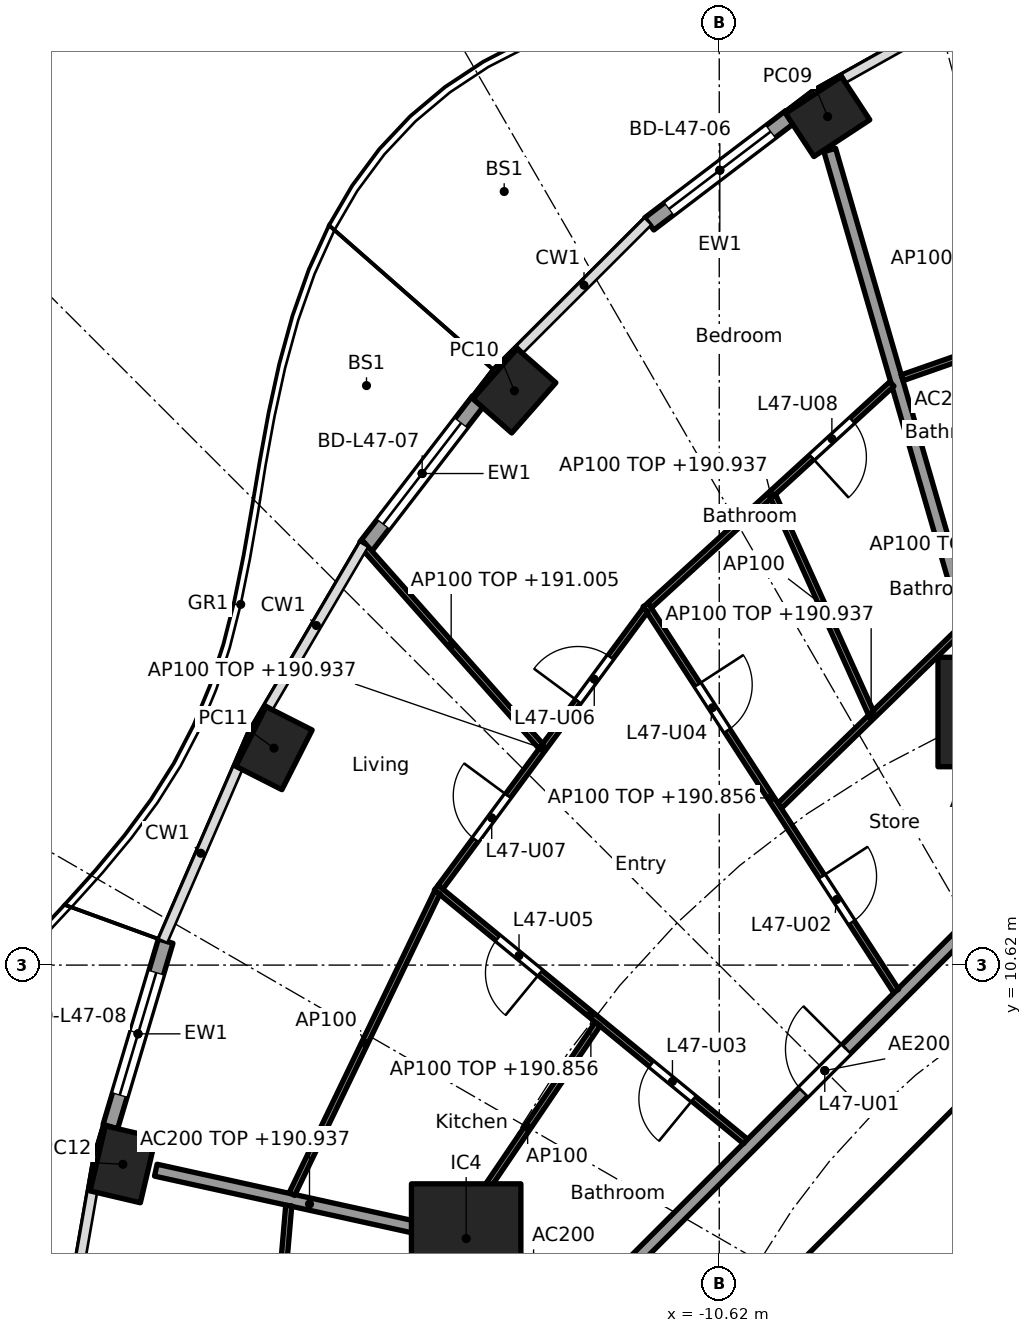
"""IFC4 building model, lengths in metres.
Left out: names, types, materials, properties, quantities, classifications, styles, units other than length and angle.
Written with IfcOpenShell. Run it as: python <this file> out.ifc"""

import sys

from ifc_helpers import new_model, si_unit, direction, frame, frame_2d, origin, origin_2d, place, context, subcontext, project, spatial, rectangle, hollow_rectangle, extrude, element, fill, save


model = new_model("IFC4")
c1 = context("Model", 3, precision=1e-05, world=origin(), true_north=direction((0.0, 1.0)))
c2 = subcontext(c1, "Body", "Model", "MODEL_VIEW")
j1 = project(units=[si_unit("LENGTHUNIT", "METRE"), si_unit("PLANEANGLEUNIT", "RADIAN")], contexts=[c1])
p1 = place(None, origin())
s1 = spatial("IfcSite", under=j1, at=p1, CompositionType="ELEMENT")
p2 = place(p1, origin())
s2 = spatial("IfcBuilding", under=s1, at=p2, CompositionType="ELEMENT")
p3 = place(p2, frame((0.0, 0.0, 188.1)))
s3 = spatial("IfcBuildingStorey", under=s2, at=p3, CompositionType="ELEMENT", Elevation=188.1)
for number, where, z_axis, x_axis in (
    (1, (-8.837, 24.573, 0.0), (0.0, 0.0, 1.0), (-0.836, -0.549, 0.0)),
    (2, (-13.989, 20.064, 0.0), (0.0, 0.0, 1.0), (-0.66, -0.751, 0.0)),
    (3, (-17.942, 14.188, 0.0), (0.0, 0.0, 1.0), (-0.452, -0.892, 0.0)),
    (4, (-20.427, 7.344, 0.0), (0.0, 0.0, 1.0), (-0.229, -0.973, 0.0)),
):
    element("IfcColumn", number, at=place(p3, frame(where, z_axis=z_axis, x_axis=x_axis)), inside=s3, PredefinedType="COLUMN", context=c2, shape_type="SweptSolid", body=[
        extrude(hollow_rectangle(XDim=1.1, YDim=0.85, WallThickness=0.036, at=origin_2d()), origin(), (0.0, 0.0, 1.0), 3.7),
    ])
for number, where, z_axis, x_axis in (
    (5, (-6.123, 14.782, 0.0), (0.0, 0.0, 1.0), (1.0, 0.0, 0.0)),
    (6, (-14.782, 6.123, 0.0), (0.0, 0.0, 1.0), (1.0, 0.0, 0.0)),
):
    element("IfcColumn", number, at=place(p3, frame(where, z_axis=z_axis, x_axis=x_axis)), inside=s3, PredefinedType="COLUMN", context=c2, shape_type="SweptSolid", body=[
        extrude(rectangle(XDim=1.8, YDim=1.8, at=origin_2d()), origin(), (0.0, 0.0, 1.0), 3.7),
    ])
p4 = place(p3, frame((-11.772, 22.809, 0.0), z_axis=(0.0, 0.0, 1.0), x_axis=(0.796055733703, 0.60522332146, 0.0)))
e7 = element("IfcWall", 7, at=p4, inside=s3, PredefinedType="SOLIDWALL", context=c2, shape_type="SweptSolid", body=[
    extrude(rectangle(XDim=2.917, YDim=0.25, at=frame_2d((1.458, 0.0))), origin(), (0.0, 0.0, 1.0), 3.44),
])
p5 = place(p4, frame((0.408, 0.0, 0.0)))
e8 = element("IfcOpeningElement", 8, at=p5, cuts=e7, PredefinedType="OPENING", context=c2, shape_type="SweptSolid", body=[
    extrude(rectangle(XDim=2.1, YDim=2.4, at=frame_2d((1.05, 1.2))), frame((0.0, 0.135, 0.0), z_axis=(0.0, -1.0, 0.0), x_axis=(1.0, 0.0, 0.0)), (0.0, 0.0, 1.0), 0.27),
])
p6 = place(p3, frame((-16.432, 17.502, 0.0), z_axis=(0.0, 0.0, 1.0), x_axis=(0.610437428894, 0.79206448311, 0.0)))
e9 = element("IfcWall", 9, at=p6, inside=s3, PredefinedType="SOLIDWALL", context=c2, shape_type="SweptSolid", body=[
    extrude(rectangle(XDim=3.035, YDim=0.25, at=frame_2d((1.518, 0.0))), origin(), (0.0, 0.0, 1.0), 3.44),
])
p7 = place(p6, frame((0.468, 0.0, 0.0)))
e10 = element("IfcOpeningElement", 10, at=p7, cuts=e9, PredefinedType="OPENING", context=c2, shape_type="SweptSolid", body=[
    extrude(rectangle(XDim=2.1, YDim=2.4, at=frame_2d((1.05, 1.2))), frame((0.0, 0.135, 0.0), z_axis=(0.0, -1.0, 0.0), x_axis=(1.0, 0.0, 0.0)), (0.0, 0.0, 1.0), 0.27),
])
p8 = place(p3, frame((-20.633, 7.965, 0.0), z_axis=(0.0, 0.0, 1.0), x_axis=(0.28584838049, 0.958274857946, 0.0)))
e11 = element("IfcWall", 11, at=p8, inside=s3, PredefinedType="SOLIDWALL", context=c2, shape_type="SweptSolid", body=[
    extrude(rectangle(XDim=3.182, YDim=0.25, at=frame_2d((1.591, 0.0))), origin(), (0.0, 0.0, 1.0), 3.44),
])
p9 = place(p8, frame((0.541, 0.0, 0.0)))
e12 = element("IfcOpeningElement", 12, at=p9, cuts=e11, PredefinedType="OPENING", context=c2, shape_type="SweptSolid", body=[
    extrude(rectangle(XDim=2.1, YDim=2.4, at=frame_2d((1.05, 1.2))), frame((0.0, 0.135, 0.0), z_axis=(0.0, -1.0, 0.0), x_axis=(1.0, 0.0, 0.0)), (0.0, 0.0, 1.0), 0.27),
])
p10 = place(p3, frame((-4.613, 9.988, 0.0), z_axis=(0.0, 0.0, 1.0), x_axis=(-0.707106781187, -0.707106781187, 0.0)))
e13 = element("IfcWall", 13, at=p10, inside=s3, PredefinedType="SHEAR", context=c2, shape_type="SweptSolid", body=[
    extrude(rectangle(XDim=7.602, YDim=0.6, at=frame_2d((3.801, 0.0))), origin(), (0.0, 0.0, 1.0), 3.44),
])
p11 = place(p10, frame((0.351, 0.0, 0.0)))
e14 = element("IfcOpeningElement", 14, at=p11, cuts=e13, PredefinedType="OPENING", context=c2, shape_type="SweptSolid", body=[
    extrude(rectangle(XDim=1.1, YDim=2.1, at=frame_2d((0.55, 1.05))), frame((0.0, 0.31, 0.0), z_axis=(0.0, -1.0, 0.0), x_axis=(1.0, 0.0, 0.0)), (0.0, 0.0, 1.0), 0.62),
])
p12 = place(p3, frame((-6.137, 14.83, 0.0), z_axis=(0.0, 0.0, 1.0), x_axis=(-0.278461169897, 0.96044748782, 0.0)))
e15 = element("IfcWall", 15, at=p12, inside=s3, PredefinedType="PARTITIONING", context=c2, shape_type="SweptSolid", body=[
    extrude(rectangle(XDim=9.573, YDim=0.2, at=frame_2d((4.787, 0.0))), origin(), (0.0, 0.0, 1.0), 2.837),
])
p13 = place(p3, frame((-12.657, 5.243, 0.0), z_axis=(0.0, 0.0, 1.0), x_axis=(-0.923859888513, 0.38273085373, 0.0)))
e16 = element("IfcWall", 16, at=p13, inside=s3, PredefinedType="PARTITIONING", context=c2, shape_type="SweptSolid", body=[
    extrude(rectangle(XDim=2.199, YDim=0.2, at=frame_2d((1.1, 0.0))), origin(), (0.0, 0.0, 1.0), 3.44),
])
p14 = place(p3, frame((-14.831, 6.134, 0.0), z_axis=(0.0, 0.0, 1.0), x_axis=(-0.976568396888, 0.215207263354, 0.0)))
e17 = element("IfcWall", 17, at=p14, inside=s3, PredefinedType="PARTITIONING", context=c2, shape_type="SweptSolid", body=[
    extrude(rectangle(XDim=5.177, YDim=0.2, at=frame_2d((2.588, 0.0))), origin(), (0.0, 0.0, 1.0), 2.837),
])
p15 = place(p3, frame((-5.275, 12.494, 0.0), z_axis=(0.0, 0.0, 1.0), x_axis=(-0.707106781187, -0.707106781187, 0.0)))
e18 = element("IfcWall", 18, at=p15, inside=s3, PredefinedType="PARTITIONING", context=c2, shape_type="SweptSolid", body=[
    extrude(rectangle(XDim=10.209, YDim=0.2, at=frame_2d((5.104, 0.0))), origin(), (0.0, 0.0, 1.0), 3.44),
])
p16 = place(p15, frame((4.604, 0.0, 0.0)))
e19 = element("IfcOpeningElement", 19, at=p16, cuts=e18, PredefinedType="OPENING", context=c2, shape_type="SweptSolid", body=[
    extrude(rectangle(XDim=1.0, YDim=2.1, at=frame_2d((0.5, 1.05))), frame((0.0, 0.11, 0.0), z_axis=(0.0, -1.0, 0.0), x_axis=(1.0, 0.0, 0.0)), (0.0, 0.0, 1.0), 0.22),
])
p17 = place(p3, frame((-2.452, 22.083, 0.0), z_axis=(0.0, 0.0, 1.0), x_axis=(-0.943918212431, -0.330179357684, 0.0)))
e20 = element("IfcWall", 20, at=p17, inside=s3, PredefinedType="PARTITIONING", context=c2, shape_type="SweptSolid", body=[
    extrude(rectangle(XDim=5.467, YDim=0.1, at=frame_2d((2.734, 0.0))), origin(), (0.0, 0.0, 1.0), 2.837),
])
p18 = place(p3, frame((-6.616, 16.166, 0.0), z_axis=(0.0, 0.0, 1.0), x_axis=(-0.716919058692, -0.697156412352, 0.0)))
e21 = element("IfcWall", 21, at=p18, inside=s3, PredefinedType="PARTITIONING", context=c2, shape_type="SweptSolid", body=[
    extrude(rectangle(XDim=4.2, YDim=0.1, at=frame_2d((2.1, 0.0))), origin(), (0.0, 0.0, 1.0), 2.837),
])
p19 = place(p3, frame((-7.781, 20.178, 0.0), z_axis=(0.0, 0.0, 1.0), x_axis=(-0.73807320557, -0.674720640872, 0.0)))
e22 = element("IfcWall", 22, at=p19, inside=s3, PredefinedType="PARTITIONING", context=c2, shape_type="SweptSolid", body=[
    extrude(rectangle(XDim=5.399, YDim=0.1, at=frame_2d((2.699, 0.0))), origin(), (0.0, 0.0, 1.0), 2.837),
])
p20 = place(p19, frame((0.887, 0.0, 0.0)))
e23 = element("IfcOpeningElement", 23, at=p20, cuts=e22, PredefinedType="OPENING", context=c2, shape_type="SweptSolid", body=[
    extrude(rectangle(XDim=0.9, YDim=2.1, at=frame_2d((0.45, 1.05))), frame((0.0, 0.06, 0.0), z_axis=(0.0, -1.0, 0.0), x_axis=(1.0, 0.0, 0.0)), (0.0, 0.0, 1.0), 0.12),
])
p21 = place(p3, frame((-8.125, 14.765, 0.0), z_axis=(0.0, 0.0, 1.0), x_axis=(-0.411745679848, 0.911298795745, 0.0)))
e24 = element("IfcWall", 24, at=p21, inside=s3, PredefinedType="PARTITIONING", context=c2, shape_type="SweptSolid", body=[
    extrude(rectangle(XDim=3.909, YDim=0.1, at=frame_2d((1.955, 0.0))), origin(), (0.0, 0.0, 1.0), 3.44),
])
p22 = place(p3, frame((-7.712, 10.195, 0.0), z_axis=(0.0, 0.0, 1.0), x_axis=(-0.544179442551, 0.838968851809, 0.0)))
e25 = element("IfcWall", 25, at=p22, inside=s3, PredefinedType="PARTITIONING", context=c2, shape_type="SweptSolid", body=[
    extrude(rectangle(XDim=7.566, YDim=0.1, at=frame_2d((3.783, 0.0))), origin(), (0.0, 0.0, 1.0), 2.756),
])
p23 = place(p22, frame((1.343, 0.0, 0.0)))
e26 = element("IfcOpeningElement", 26, at=p23, cuts=e25, PredefinedType="OPENING", context=c2, shape_type="SweptSolid", body=[
    extrude(rectangle(XDim=0.9, YDim=2.1, at=frame_2d((0.45, 1.05))), frame((0.0, 0.06, 0.0), z_axis=(0.0, -1.0, 0.0), x_axis=(1.0, 0.0, 0.0)), (0.0, 0.0, 1.0), 0.12),
])
p24 = place(p22, frame((5.101, 0.0, 0.0)))
e27 = element("IfcOpeningElement", 27, at=p24, cuts=e25, PredefinedType="OPENING", context=c2, shape_type="SweptSolid", body=[
    extrude(rectangle(XDim=0.9, YDim=2.1, at=frame_2d((0.45, 1.05))), frame((0.0, 0.06, 0.0), z_axis=(0.0, -1.0, 0.0), x_axis=(1.0, 0.0, 0.0)), (0.0, 0.0, 1.0), 0.12),
])
p25 = place(p3, frame((-11.832, 16.461, 0.0), z_axis=(0.0, 0.0, 1.0), x_axis=(-0.594704483906, -0.803944386647, 0.0)))
e28 = element("IfcWall", 28, at=p25, inside=s3, PredefinedType="PARTITIONING", context=c2, shape_type="SweptSolid", body=[
    extrude(rectangle(XDim=5.672, YDim=0.1, at=frame_2d((2.836, 0.0))), origin(), (0.0, 0.0, 1.0), 2.837),
])
p26 = place(p25, frame((0.968, 0.0, 0.0)))
e29 = element("IfcOpeningElement", 29, at=p26, cuts=e28, PredefinedType="OPENING", context=c2, shape_type="SweptSolid", body=[
    extrude(rectangle(XDim=0.9, YDim=2.1, at=frame_2d((0.45, 1.05))), frame((0.0, 0.06, 0.0), z_axis=(0.0, -1.0, 0.0), x_axis=(1.0, 0.0, 0.0)), (0.0, 0.0, 1.0), 0.12),
])
p27 = place(p25, frame((3.804, 0.0, 0.0)))
e30 = element("IfcOpeningElement", 30, at=p27, cuts=e28, PredefinedType="OPENING", context=c2, shape_type="SweptSolid", body=[
    extrude(rectangle(XDim=0.9, YDim=2.1, at=frame_2d((0.45, 1.05))), frame((0.0, 0.06, 0.0), z_axis=(0.0, -1.0, 0.0), x_axis=(1.0, 0.0, 0.0)), (0.0, 0.0, 1.0), 0.12),
])
p28 = place(p3, frame((-13.552, 14.219, 0.0), z_axis=(0.0, 0.0, 1.0), x_axis=(-0.663542794709, 0.748138329181, 0.0)))
e31 = element("IfcWall", 31, at=p28, inside=s3, PredefinedType="PARTITIONING", context=c2, shape_type="SweptSolid", body=[
    extrude(rectangle(XDim=4.45, YDim=0.1, at=frame_2d((2.225, 0.0))), origin(), (0.0, 0.0, 1.0), 2.905),
])
p29 = place(p3, frame((-10.189, 7.721, 0.0), z_axis=(0.0, 0.0, 1.0), x_axis=(-0.773121441079, 0.634258021112, 0.0)))
e32 = element("IfcWall", 32, at=p29, inside=s3, PredefinedType="PARTITIONING", context=c2, shape_type="SweptSolid", body=[
    extrude(rectangle(XDim=6.577, YDim=0.1, at=frame_2d((3.289, 0.0))), origin(), (0.0, 0.0, 1.0), 2.756),
])
p30 = place(p29, frame((1.104, 0.0, 0.0)))
e33 = element("IfcOpeningElement", 33, at=p30, cuts=e32, PredefinedType="OPENING", context=c2, shape_type="SweptSolid", body=[
    extrude(rectangle(XDim=0.9, YDim=2.1, at=frame_2d((0.45, 1.05))), frame((0.0, 0.06, 0.0), z_axis=(0.0, -1.0, 0.0), x_axis=(1.0, 0.0, 0.0)), (0.0, 0.0, 1.0), 0.12),
])
p31 = place(p29, frame((4.367, 0.0, 0.0)))
e34 = element("IfcOpeningElement", 34, at=p31, cuts=e32, PredefinedType="OPENING", context=c2, shape_type="SweptSolid", body=[
    extrude(rectangle(XDim=0.9, YDim=2.1, at=frame_2d((0.45, 1.05))), frame((0.0, 0.06, 0.0), z_axis=(0.0, -1.0, 0.0), x_axis=(1.0, 0.0, 0.0)), (0.0, 0.0, 1.0), 0.12),
])
p32 = place(p3, frame((-12.619, 9.65, 0.0), z_axis=(0.0, 0.0, 1.0), x_axis=(-0.561046521684, -0.82778427172, 0.0)))
e35 = element("IfcWall", 35, at=p32, inside=s3, PredefinedType="PARTITIONING", context=c2, shape_type="SweptSolid", body=[
    extrude(rectangle(XDim=4.109, YDim=0.1, at=frame_2d((2.054, 0.0))), origin(), (0.0, 0.0, 1.0), 3.44),
])
p33 = place(p3, frame((-15.257, 11.816, 0.0), z_axis=(0.0, 0.0, 1.0), x_axis=(-0.434027506504, -0.900899619046, 0.0)))
e36 = element("IfcWall", 36, at=p33, inside=s3, PredefinedType="PARTITIONING", context=c2, shape_type="SweptSolid", body=[
    extrude(rectangle(XDim=5.508, YDim=0.1, at=frame_2d((2.754, 0.0))), origin(), (0.0, 0.0, 1.0), 3.44),
])
p34 = place(p3, frame((-14.986, 6.067, 0.0), z_axis=(0.0, 0.0, 1.0), x_axis=(-0.056333452925, -0.998412010185, 0.0)))
e37 = element("IfcWall", 37, at=p34, inside=s3, PredefinedType="PARTITIONING", context=c2, shape_type="SweptSolid", body=[
    extrude(rectangle(XDim=3.038, YDim=0.1, at=frame_2d((1.519, 0.0))), origin(), (0.0, 0.0, 1.0), 2.837),
])
p35 = place(p3, frame((-17.7, 6.664, 0.0), z_axis=(0.0, 0.0, 1.0), x_axis=(-0.086004282666, -0.996294767307, 0.0)))
e38 = element("IfcWall", 38, at=p35, inside=s3, PredefinedType="PARTITIONING", context=c2, shape_type="SweptSolid", body=[
    extrude(rectangle(XDim=6.739, YDim=0.1, at=frame_2d((3.37, 0.0))), origin(), (0.0, 0.0, 1.0), 2.837),
])
p36 = place(p35, frame((4.542, 0.0, 0.0)))
e39 = element("IfcOpeningElement", 39, at=p36, cuts=e38, PredefinedType="OPENING", context=c2, shape_type="SweptSolid", body=[
    extrude(rectangle(XDim=0.9, YDim=2.1, at=frame_2d((0.45, 1.05))), frame((0.0, 0.06, 0.0), z_axis=(0.0, -1.0, 0.0), x_axis=(1.0, 0.0, 0.0)), (0.0, 0.0, 1.0), 0.12),
])
p37 = place(p5, origin())
e40 = element("IfcDoor", 40, at=p37, inside=s3, OperationType="SLIDING_TO_LEFT", PredefinedType="DOOR", context=c2, shape_type="SweptSolid", body=[
    extrude(rectangle(XDim=2.1, YDim=2.4, at=frame_2d((1.05, 1.2))), frame((0.0, 0.025, 0.0), z_axis=(0.0, -1.0, 0.0), x_axis=(1.0, 0.0, 0.0)), (0.0, 0.0, 1.0), 0.05),
])
fill(e8, e40)
p38 = place(p7, origin())
e41 = element("IfcDoor", 41, at=p38, inside=s3, OperationType="SLIDING_TO_LEFT", PredefinedType="DOOR", context=c2, shape_type="SweptSolid", body=[
    extrude(rectangle(XDim=2.1, YDim=2.4, at=frame_2d((1.05, 1.2))), frame((0.0, 0.025, 0.0), z_axis=(0.0, -1.0, 0.0), x_axis=(1.0, 0.0, 0.0)), (0.0, 0.0, 1.0), 0.05),
])
fill(e10, e41)
p39 = place(p9, origin())
e42 = element("IfcDoor", 42, at=p39, inside=s3, OperationType="SLIDING_TO_LEFT", PredefinedType="DOOR", context=c2, shape_type="SweptSolid", body=[
    extrude(rectangle(XDim=2.1, YDim=2.4, at=frame_2d((1.05, 1.2))), frame((0.0, 0.025, 0.0), z_axis=(0.0, -1.0, 0.0), x_axis=(1.0, 0.0, 0.0)), (0.0, 0.0, 1.0), 0.05),
])
fill(e12, e42)
p40 = place(p16, frame((1.0, 0.0, 0.0), x_axis=(-1.0, 0.0, 0.0)))
e43 = element("IfcDoor", 43, at=p40, inside=s3, OperationType="SINGLE_SWING_RIGHT", PredefinedType="DOOR", context=c2, shape_type="SweptSolid", body=[
    extrude(rectangle(XDim=1.0, YDim=2.1, at=frame_2d((0.5, 1.05))), frame((0.0, 0.025, 0.0), z_axis=(0.0, -1.0, 0.0), x_axis=(1.0, 0.0, 0.0)), (0.0, 0.0, 1.0), 0.05),
])
fill(e19, e43)
p41 = place(p23, frame((0.9, 0.0, 0.0), x_axis=(-1.0, 0.0, 0.0)))
e44 = element("IfcDoor", 44, at=p41, inside=s3, OperationType="SINGLE_SWING_LEFT", PredefinedType="DOOR", context=c2, shape_type="SweptSolid", body=[
    extrude(rectangle(XDim=0.9, YDim=2.1, at=frame_2d((0.45, 1.05))), frame((0.0, 0.025, 0.0), z_axis=(0.0, -1.0, 0.0), x_axis=(1.0, 0.0, 0.0)), (0.0, 0.0, 1.0), 0.05),
])
fill(e26, e44)
p42 = place(p30, origin())
e45 = element("IfcDoor", 45, at=p42, inside=s3, OperationType="SINGLE_SWING_LEFT", PredefinedType="DOOR", context=c2, shape_type="SweptSolid", body=[
    extrude(rectangle(XDim=0.9, YDim=2.1, at=frame_2d((0.45, 1.05))), frame((0.0, 0.025, 0.0), z_axis=(0.0, -1.0, 0.0), x_axis=(1.0, 0.0, 0.0)), (0.0, 0.0, 1.0), 0.05),
])
fill(e33, e45)
p43 = place(p24, frame((0.9, 0.0, 0.0), x_axis=(-1.0, 0.0, 0.0)))
e46 = element("IfcDoor", 46, at=p43, inside=s3, OperationType="SINGLE_SWING_LEFT", PredefinedType="DOOR", context=c2, shape_type="SweptSolid", body=[
    extrude(rectangle(XDim=0.9, YDim=2.1, at=frame_2d((0.45, 1.05))), frame((0.0, 0.025, 0.0), z_axis=(0.0, -1.0, 0.0), x_axis=(1.0, 0.0, 0.0)), (0.0, 0.0, 1.0), 0.05),
])
fill(e27, e46)
p44 = place(p31, origin())
e47 = element("IfcDoor", 47, at=p44, inside=s3, OperationType="SINGLE_SWING_LEFT", PredefinedType="DOOR", context=c2, shape_type="SweptSolid", body=[
    extrude(rectangle(XDim=0.9, YDim=2.1, at=frame_2d((0.45, 1.05))), frame((0.0, 0.025, 0.0), z_axis=(0.0, -1.0, 0.0), x_axis=(1.0, 0.0, 0.0)), (0.0, 0.0, 1.0), 0.05),
])
fill(e34, e47)
p45 = place(p26, frame((0.9, 0.0, 0.0), x_axis=(-1.0, 0.0, 0.0)))
e48 = element("IfcDoor", 48, at=p45, inside=s3, OperationType="SINGLE_SWING_LEFT", PredefinedType="DOOR", context=c2, shape_type="SweptSolid", body=[
    extrude(rectangle(XDim=0.9, YDim=2.1, at=frame_2d((0.45, 1.05))), frame((0.0, 0.025, 0.0), z_axis=(0.0, -1.0, 0.0), x_axis=(1.0, 0.0, 0.0)), (0.0, 0.0, 1.0), 0.05),
])
fill(e29, e48)
p46 = place(p27, frame((0.9, 0.0, 0.0), x_axis=(-1.0, 0.0, 0.0)))
e49 = element("IfcDoor", 49, at=p46, inside=s3, OperationType="SINGLE_SWING_RIGHT", PredefinedType="DOOR", context=c2, shape_type="SweptSolid", body=[
    extrude(rectangle(XDim=0.9, YDim=2.1, at=frame_2d((0.45, 1.05))), frame((0.0, 0.025, 0.0), z_axis=(0.0, -1.0, 0.0), x_axis=(1.0, 0.0, 0.0)), (0.0, 0.0, 1.0), 0.05),
])
fill(e30, e49)
p47 = place(p20, origin())
e50 = element("IfcDoor", 50, at=p47, inside=s3, OperationType="SINGLE_SWING_RIGHT", PredefinedType="DOOR", context=c2, shape_type="SweptSolid", body=[
    extrude(rectangle(XDim=0.9, YDim=2.1, at=frame_2d((0.45, 1.05))), frame((0.0, 0.025, 0.0), z_axis=(0.0, -1.0, 0.0), x_axis=(1.0, 0.0, 0.0)), (0.0, 0.0, 1.0), 0.05),
])
fill(e23, e50)
save(model, sys.argv[1])
